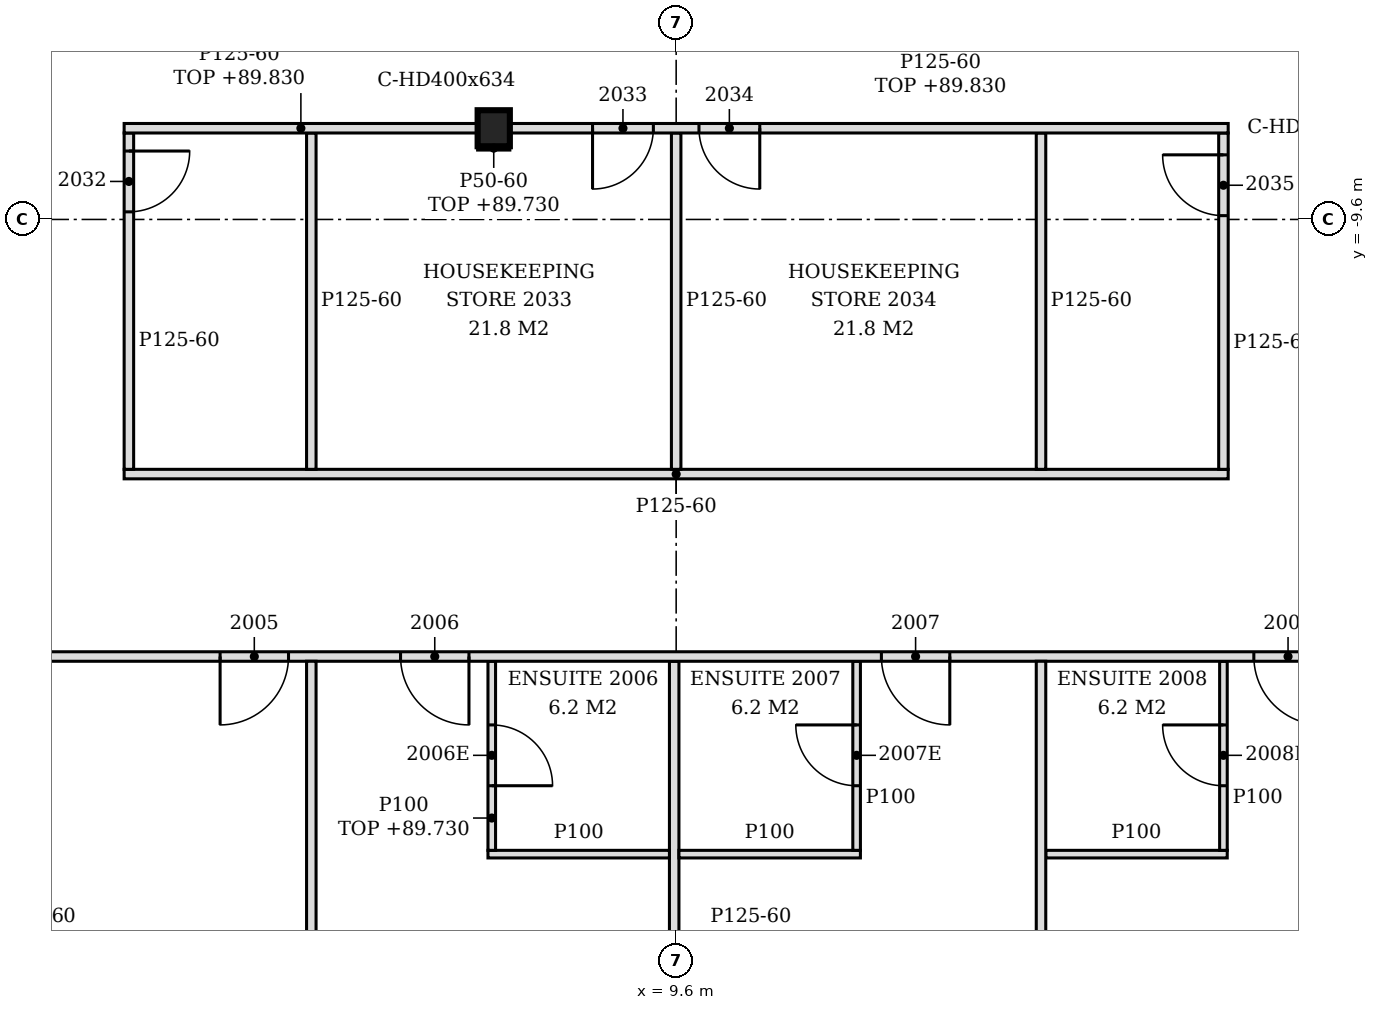
"""IFC4 building model, lengths in metres.
Left out: names, types, materials, properties, quantities, classifications, styles, units other than length and angle.
Written with IfcOpenShell. Run it as: python <this file> out.ifc"""

import sys

from ifc_helpers import new_model, si_unit, direction, frame, frame_2d, origin, origin_2d, place, context, subcontext, project, spatial, polyline, rectangle, i_section, outline, extrude, element, fill, save


model = new_model("IFC4")
c1 = context("Model", 3, precision=1e-05, world=origin(), true_north=direction((0.0, 1.0)))
c2 = subcontext(c1, "Body", "Model", "MODEL_VIEW")
j1 = project(units=[si_unit("LENGTHUNIT", "METRE"), si_unit("PLANEANGLEUNIT", "RADIAN")], contexts=[c1])
p1 = place(None, origin())
s1 = spatial("IfcSite", under=j1, at=p1, CompositionType="ELEMENT")
p2 = place(p1, origin())
s2 = spatial("IfcBuilding", under=s1, at=p2, CompositionType="ELEMENT")
p3 = place(p2, frame((0.0, 0.0, 87.0)))
s3 = spatial("IfcBuildingStorey", under=s2, at=p3, CompositionType="ELEMENT", Elevation=87.0)
p4 = place(p3, frame((7.2, -8.4, -0.15), z_axis=(0.0, 0.0, 1.0), x_axis=(1.0, 0.0, 0.0)))
e1 = element("IfcColumn", 1, at=p4, inside=s3, PredefinedType="COLUMN", context=c2, shape_type="SweptSolid", body=[
    extrude(i_section(OverallWidth=0.424, OverallDepth=0.474, WebThickness=0.048, FlangeThickness=0.077, FilletRadius=0.015, at=origin_2d()), origin(), (0.0, 0.0, 1.0), 3.6),
])
for number, where, z_axis, x_axis in (
    (2, (4.8, -23.65, 0.0), (0.0, 0.0, 1.0), (0.0, 1.0, 0.0)),
    (3, (14.4, -23.65, 0.0), (0.0, 0.0, 1.0), (0.0, 1.0, 0.0)),
):
    element("IfcWall", number, at=place(p3, frame(where, z_axis=z_axis, x_axis=x_axis)), inside=s3, PredefinedType="PARTITIONING", context=c2, shape_type="SweptSolid", body=[
        extrude(outline(polyline([(0.0, 0.0), (8.237, 0.0), (8.238, 3.45), (4.769, 3.45), (4.767, 2.88), (4.559, 2.88), (4.557, 3.45), (0.914, 3.45), (0.912, 2.93), (0.614, 2.93), (0.612, 3.45), (0.0, 3.45), (0.0, 0.0)])), frame((0.0, 0.062, 0.0), z_axis=(0.0, -1.0, 0.0), x_axis=(1.0, 0.0, 0.0)), (0.0, 0.0, 1.0), 0.125),
    ])
p5 = place(p3, frame((9.574, -22.466, 0.0), z_axis=(0.0, 0.0, 1.0), x_axis=(0.0, 1.0, 0.0)))
e4 = element("IfcWall", 4, at=p5, inside=s3, PredefinedType="PARTITIONING", context=c2, shape_type="SweptSolid", body=[
    extrude(outline(polyline([(0.0, 0.0), (7.053, 0.0), (7.053, 0.863), (7.053, 1.725), (7.053, 2.587), (7.053, 2.88), (0.055, 2.88), (0.055, 2.587), (0.055, 1.725), (0.051, 0.863), (0.0, 0.0)])), frame((0.0, 0.062, 0.0), z_axis=(0.0, -1.0, 0.0), x_axis=(1.0, 0.0, 0.0)), (0.0, 0.0, 1.0), 0.125),
])
p6 = place(p3, frame((7.124, -17.95, 0.0), z_axis=(0.0, 0.0, 1.0), x_axis=(1.0, 0.0, 0.0)))
e5 = element("IfcWall", 5, at=p6, inside=s3, PredefinedType="PARTITIONING", context=c2, shape_type="SweptSolid", body=[
    extrude(outline(polyline([(0.0, 0.0), (2.387, 0.0), (2.387, 3.45), (0.226, 3.45), (0.224, 2.73), (0.0, 2.73), (0.0, 0.0)])), frame((0.0, 0.05, 0.0), z_axis=(0.0, -1.0, 0.0), x_axis=(1.0, 0.0, 0.0)), (0.0, 0.0, 1.0), 0.1),
])
p7 = place(p3, frame((7.174, -17.9, 0.0), z_axis=(0.0, 0.0, 1.0), x_axis=(0.0, 1.0, 0.0)))
e6 = element("IfcWall", 6, at=p7, inside=s3, PredefinedType="PARTITIONING", context=c2, shape_type="SweptSolid", body=[
    extrude(rectangle(XDim=2.487, YDim=0.1, at=frame_2d((1.244, 0.0))), origin(), (0.0, 0.0, 1.0), 2.73),
])
p8 = place(p7, frame((0.85, 0.0, 0.0)))
e7 = element("IfcOpeningElement", 7, at=p8, cuts=e6, PredefinedType="OPENING", context=c2, shape_type="SweptSolid", body=[
    extrude(rectangle(XDim=0.8, YDim=2.1, at=frame_2d((0.4, 1.05))), frame((0.0, 0.06, 0.0), z_axis=(0.0, -1.0, 0.0), x_axis=(1.0, 0.0, 0.0)), (0.0, 0.0, 1.0), 0.12),
])
p9 = place(p3, frame((9.636, -17.95, 0.0), z_axis=(0.0, 0.0, 1.0), x_axis=(1.0, 0.0, 0.0)))
e8 = element("IfcWall", 8, at=p9, inside=s3, PredefinedType="PARTITIONING", context=c2, shape_type="SweptSolid", body=[
    extrude(rectangle(XDim=2.387, YDim=0.1, at=frame_2d((1.194, 0.0))), origin(), (0.0, 0.0, 1.0), 3.45),
])
p10 = place(p3, frame((11.974, -17.9, 0.0), z_axis=(0.0, 0.0, 1.0), x_axis=(0.0, 1.0, 0.0)))
e9 = element("IfcWall", 9, at=p10, inside=s3, PredefinedType="PARTITIONING", context=c2, shape_type="SweptSolid", body=[
    extrude(rectangle(XDim=2.487, YDim=0.1, at=frame_2d((1.244, 0.0))), origin(), (0.0, 0.0, 1.0), 3.45),
])
p11 = place(p10, frame((0.85, 0.0, 0.0)))
e10 = element("IfcOpeningElement", 10, at=p11, cuts=e9, PredefinedType="OPENING", context=c2, shape_type="SweptSolid", body=[
    extrude(rectangle(XDim=0.8, YDim=2.1, at=frame_2d((0.4, 1.05))), frame((0.0, 0.06, 0.0), z_axis=(0.0, -1.0, 0.0), x_axis=(1.0, 0.0, 0.0)), (0.0, 0.0, 1.0), 0.12),
])
p12 = place(p3, frame((14.462, -17.95, 0.0), z_axis=(0.0, 0.0, 1.0), x_axis=(1.0, 0.0, 0.0)))
e11 = element("IfcWall", 11, at=p12, inside=s3, PredefinedType="PARTITIONING", context=c2, shape_type="SweptSolid", body=[
    extrude(rectangle(XDim=2.388, YDim=0.1, at=frame_2d((1.194, 0.0))), origin(), (0.0, 0.0, 1.0), 3.45),
])
p13 = place(p3, frame((16.8, -17.9, 0.0), z_axis=(0.0, 0.0, 1.0), x_axis=(0.0, 1.0, 0.0)))
e12 = element("IfcWall", 12, at=p13, inside=s3, PredefinedType="PARTITIONING", context=c2, shape_type="SweptSolid", body=[
    extrude(rectangle(XDim=2.487, YDim=0.1, at=frame_2d((1.244, 0.0))), origin(), (0.0, 0.0, 1.0), 3.45),
])
p14 = place(p13, frame((0.85, 0.0, 0.0)))
e13 = element("IfcOpeningElement", 13, at=p14, cuts=e12, PredefinedType="OPENING", context=c2, shape_type="SweptSolid", body=[
    extrude(rectangle(XDim=0.8, YDim=2.1, at=frame_2d((0.4, 1.05))), frame((0.0, 0.06, 0.0), z_axis=(0.0, -1.0, 0.0), x_axis=(1.0, 0.0, 0.0)), (0.0, 0.0, 1.0), 0.12),
])
p15 = place(p3, frame((-22.75, -15.35, 0.0), z_axis=(0.0, 0.0, 1.0), x_axis=(1.0, 0.0, 0.0)))
e14 = element("IfcWall", 14, at=p15, inside=s3, PredefinedType="PARTITIONING", context=c2, shape_type="SweptSolid", body=[
    extrude(outline(polyline([(0.0, 0.0), (41.887, 0.0), (41.887, 2.73), (41.8, 2.73), (41.798, 3.45), (30.1, 3.45), (30.098, 2.73), (29.8, 2.73), (29.798, 3.45), (18.1, 3.45), (18.098, 2.73), (17.8, 2.73), (17.798, 3.45), (8.5, 3.45), (8.498, 2.93), (8.2, 2.93), (8.198, 3.45), (0.0, 3.45), (0.0, 0.0)])), frame((0.0, 0.062, 0.0), z_axis=(0.0, -1.0, 0.0), x_axis=(1.0, 0.0, 0.0)), (0.0, 0.0, 1.0), 0.125),
])
p16 = place(p15, frame((7.15, 0.0, 0.0)))
e15 = element("IfcOpeningElement", 15, at=p16, cuts=e14, PredefinedType="OPENING", context=c2, shape_type="SweptSolid", body=[
    extrude(rectangle(XDim=0.9, YDim=2.1, at=frame_2d((0.45, 1.05))), frame((0.0, 0.073, 0.0), z_axis=(0.0, -1.0, 0.0), x_axis=(1.0, 0.0, 0.0)), (0.0, 0.0, 1.0), 0.145),
])
p17 = place(p15, frame((9.897, 0.0, 0.0)))
e16 = element("IfcOpeningElement", 16, at=p17, cuts=e14, PredefinedType="OPENING", context=c2, shape_type="SweptSolid", body=[
    extrude(rectangle(XDim=0.9, YDim=2.1, at=frame_2d((0.45, 1.05))), frame((0.0, 0.073, 0.0), z_axis=(0.0, -1.0, 0.0), x_axis=(1.0, 0.0, 0.0)), (0.0, 0.0, 1.0), 0.145),
])
p18 = place(p15, frame((16.75, 0.0, 0.0)))
e17 = element("IfcOpeningElement", 17, at=p18, cuts=e14, PredefinedType="OPENING", context=c2, shape_type="SweptSolid", body=[
    extrude(rectangle(XDim=0.9, YDim=2.1, at=frame_2d((0.45, 1.05))), frame((0.0, 0.073, 0.0), z_axis=(0.0, -1.0, 0.0), x_axis=(1.0, 0.0, 0.0)), (0.0, 0.0, 1.0), 0.145),
])
p19 = place(p15, frame((19.31, 0.0, 0.0)))
e18 = element("IfcOpeningElement", 18, at=p19, cuts=e14, PredefinedType="OPENING", context=c2, shape_type="SweptSolid", body=[
    extrude(rectangle(XDim=0.9, YDim=2.1, at=frame_2d((0.45, 1.05))), frame((0.0, 0.073, 0.0), z_axis=(0.0, -1.0, 0.0), x_axis=(1.0, 0.0, 0.0)), (0.0, 0.0, 1.0), 0.145),
])
p20 = place(p15, frame((26.35, 0.0, 0.0)))
e19 = element("IfcOpeningElement", 19, at=p20, cuts=e14, PredefinedType="OPENING", context=c2, shape_type="SweptSolid", body=[
    extrude(rectangle(XDim=0.9, YDim=2.1, at=frame_2d((0.45, 1.05))), frame((0.0, 0.073, 0.0), z_axis=(0.0, -1.0, 0.0), x_axis=(1.0, 0.0, 0.0)), (0.0, 0.0, 1.0), 0.145),
])
p21 = place(p15, frame((28.724, 0.0, 0.0)))
e20 = element("IfcOpeningElement", 20, at=p21, cuts=e14, PredefinedType="OPENING", context=c2, shape_type="SweptSolid", body=[
    extrude(rectangle(XDim=0.9, YDim=2.1, at=frame_2d((0.45, 1.05))), frame((0.0, 0.073, 0.0), z_axis=(0.0, -1.0, 0.0), x_axis=(1.0, 0.0, 0.0)), (0.0, 0.0, 1.0), 0.145),
])
p22 = place(p15, frame((35.05, 0.0, 0.0)))
e21 = element("IfcOpeningElement", 21, at=p22, cuts=e14, PredefinedType="OPENING", context=c2, shape_type="SweptSolid", body=[
    extrude(rectangle(XDim=0.9, YDim=2.1, at=frame_2d((0.45, 1.05))), frame((0.0, 0.073, 0.0), z_axis=(0.0, -1.0, 0.0), x_axis=(1.0, 0.0, 0.0)), (0.0, 0.0, 1.0), 0.145),
])
p23 = place(p15, frame((39.95, 0.0, 0.0)))
e22 = element("IfcOpeningElement", 22, at=p23, cuts=e14, PredefinedType="OPENING", context=c2, shape_type="SweptSolid", body=[
    extrude(rectangle(XDim=0.9, YDim=2.1, at=frame_2d((0.45, 1.05))), frame((0.0, 0.073, 0.0), z_axis=(0.0, -1.0, 0.0), x_axis=(1.0, 0.0, 0.0)), (0.0, 0.0, 1.0), 0.145),
])
p24 = place(p3, frame((2.337, -12.95, 0.0), z_axis=(0.0, 0.0, 1.0), x_axis=(1.0, 0.0, 0.0)))
e23 = element("IfcWall", 23, at=p24, inside=s3, PredefinedType="PARTITIONING", context=c2, shape_type="SweptSolid", body=[
    extrude(outline(polyline([(0.0, 0.0), (14.525, 0.0), (14.525, 3.45), (5.012, 3.45), (5.01, 2.73), (4.712, 2.73), (4.71, 3.45), (0.0, 3.45), (0.0, 0.0)])), frame((0.0, 0.062, 0.0), z_axis=(0.0, -1.0, 0.0), x_axis=(1.0, 0.0, 0.0)), (0.0, 0.0, 1.0), 0.125),
])
p25 = place(p3, frame((2.4, -12.887, 0.0), z_axis=(0.0, 0.0, 1.0), x_axis=(0.0, 1.0, 0.0)))
e24 = element("IfcWall", 24, at=p25, inside=s3, PredefinedType="PARTITIONING", context=c2, shape_type="SweptSolid", body=[
    extrude(outline(polyline([(0.0, 0.0), (4.425, 0.0), (4.425, 2.83), (4.337, 2.83), (4.335, 3.45), (0.0, 3.45), (0.0, 0.0)])), frame((0.0, 0.062, 0.0), z_axis=(0.0, -1.0, 0.0), x_axis=(1.0, 0.0, 0.0)), (0.0, 0.0, 1.0), 0.125),
])
p26 = place(p25, frame((3.387, 0.0, 0.0)))
e25 = element("IfcOpeningElement", 25, at=p26, cuts=e24, PredefinedType="OPENING", context=c2, shape_type="SweptSolid", body=[
    extrude(rectangle(XDim=0.8, YDim=2.1, at=frame_2d((0.4, 1.05))), frame((0.0, 0.073, 0.0), z_axis=(0.0, -1.0, 0.0), x_axis=(1.0, 0.0, 0.0)), (0.0, 0.0, 1.0), 0.145),
])
for number, where, z_axis, x_axis in (
    (26, (4.8, -12.887, 0.0), (0.0, 0.0, 1.0), (0.0, 1.0, 0.0)),
    (27, (9.6, -12.887, 0.0), (0.0, 0.0, 1.0), (0.0, 1.0, 0.0)),
    (28, (14.4, -12.887, 0.0), (0.0, 0.0, 1.0), (0.0, 1.0, 0.0)),
):
    element("IfcWall", number, at=place(p3, frame(where, z_axis=z_axis, x_axis=x_axis)), inside=s3, PredefinedType="PARTITIONING", context=c2, shape_type="SweptSolid", body=[
        extrude(outline(polyline([(0.0, 0.0), (4.425, 0.0), (4.425, 2.83), (4.337, 2.83), (4.335, 3.45), (0.0, 3.45), (0.0, 0.0)])), frame((0.0, 0.062, 0.0), z_axis=(0.0, -1.0, 0.0), x_axis=(1.0, 0.0, 0.0)), (0.0, 0.0, 1.0), 0.125),
    ])
p27 = place(p3, frame((16.8, -12.887, 0.0), z_axis=(0.0, 0.0, 1.0), x_axis=(0.0, 1.0, 0.0)))
e29 = element("IfcWall", 29, at=p27, inside=s3, PredefinedType="PARTITIONING", context=c2, shape_type="SweptSolid", body=[
    extrude(outline(polyline([(0.0, 0.0), (4.425, 0.0), (4.425, 2.83), (4.337, 2.83), (4.335, 3.45), (0.0, 3.45), (0.0, 0.0)])), frame((0.0, 0.062, 0.0), z_axis=(0.0, -1.0, 0.0), x_axis=(1.0, 0.0, 0.0)), (0.0, 0.0, 1.0), 0.125),
])
p28 = place(p27, frame((3.337, 0.0, 0.0)))
e30 = element("IfcOpeningElement", 30, at=p28, cuts=e29, PredefinedType="OPENING", context=c2, shape_type="SweptSolid", body=[
    extrude(rectangle(XDim=0.8, YDim=2.1, at=frame_2d((0.4, 1.05))), frame((0.0, 0.073, 0.0), z_axis=(0.0, -1.0, 0.0), x_axis=(1.0, 0.0, 0.0)), (0.0, 0.0, 1.0), 0.145),
])
p29 = place(p3, frame((2.337, -8.4, 0.0), z_axis=(0.0, 0.0, 1.0), x_axis=(1.0, 0.0, 0.0)))
e31 = element("IfcWall", 31, at=p29, inside=s3, PredefinedType="PARTITIONING", context=c2, shape_type="SweptSolid", body=[
    extrude(rectangle(XDim=4.651, YDim=0.125, at=frame_2d((2.325, 0.0))), origin(), (0.0, 0.0, 1.0), 2.83),
])
p30 = place(p3, frame((7.412, -8.4, 0.0), z_axis=(0.0, 0.0, 1.0), x_axis=(1.0, 0.0, 0.0)))
e32 = element("IfcWall", 32, at=p30, inside=s3, PredefinedType="PARTITIONING", context=c2, shape_type="SweptSolid", body=[
    extrude(rectangle(XDim=9.45, YDim=0.125, at=frame_2d((4.725, 0.0))), origin(), (0.0, 0.0, 1.0), 2.83),
])
p31 = place(p30, frame((1.088, 0.0, 0.0)))
e33 = element("IfcOpeningElement", 33, at=p31, cuts=e32, PredefinedType="OPENING", context=c2, shape_type="SweptSolid", body=[
    extrude(rectangle(XDim=0.8, YDim=2.1, at=frame_2d((0.4, 1.05))), frame((0.0, 0.073, 0.0), z_axis=(0.0, -1.0, 0.0), x_axis=(1.0, 0.0, 0.0)), (0.0, 0.0, 1.0), 0.145),
])
p32 = place(p30, frame((2.488, 0.0, 0.0)))
e34 = element("IfcOpeningElement", 34, at=p32, cuts=e32, PredefinedType="OPENING", context=c2, shape_type="SweptSolid", body=[
    extrude(rectangle(XDim=0.8, YDim=2.1, at=frame_2d((0.4, 1.05))), frame((0.0, 0.073, 0.0), z_axis=(0.0, -1.0, 0.0), x_axis=(1.0, 0.0, 0.0)), (0.0, 0.0, 1.0), 0.145),
])
p33 = place(p3, frame((6.988, -8.662, 0.0), z_axis=(0.0, 0.0, 1.0), x_axis=(1.0, 0.0, 0.0)))
e35 = element("IfcWall", 35, at=p33, inside=s3, PredefinedType="PARTITIONING", context=c2, shape_type="SweptSolid", body=[
    extrude(rectangle(XDim=0.424, YDim=0.05, at=frame_2d((0.212, 0.0))), origin(), (0.0, 0.0, 1.0), 2.73),
])
p34 = place(p20, frame((0.9, 0.0, 0.0), z_axis=(0.0, 0.0, 1.0), x_axis=(-1.0, 0.0, 0.0)))
e36 = element("IfcDoor", 36, at=p34, inside=s3, OperationType="SINGLE_SWING_RIGHT", PredefinedType="DOOR", context=c2, shape_type="SweptSolid", body=[
    extrude(rectangle(XDim=0.9, YDim=2.1, at=frame_2d((0.45, 1.05))), frame((0.0, 0.025, 0.0), z_axis=(0.0, -1.0, 0.0), x_axis=(1.0, 0.0, 0.0)), (0.0, 0.0, 1.0), 0.05),
])
fill(e19, e36)
p35 = place(p21, frame((0.9, 0.0, 0.0), z_axis=(0.0, 0.0, 1.0), x_axis=(-1.0, 0.0, 0.0)))
e37 = element("IfcDoor", 37, at=p35, inside=s3, OperationType="SINGLE_SWING_LEFT", PredefinedType="DOOR", context=c2, shape_type="SweptSolid", body=[
    extrude(rectangle(XDim=0.9, YDim=2.1, at=frame_2d((0.45, 1.05))), frame((0.0, 0.025, 0.0), z_axis=(0.0, -1.0, 0.0), x_axis=(1.0, 0.0, 0.0)), (0.0, 0.0, 1.0), 0.05),
])
fill(e20, e37)
p36 = place(p8, frame((0.8, 0.0, 0.0), z_axis=(0.0, 0.0, 1.0), x_axis=(-1.0, 0.0, 0.0)))
e38 = element("IfcDoor", 38, at=p36, inside=s3, OperationType="SINGLE_SWING_RIGHT", PredefinedType="DOOR", context=c2, shape_type="SweptSolid", body=[
    extrude(rectangle(XDim=0.8, YDim=2.1, at=frame_2d((0.4, 1.05))), frame((0.0, 0.025, 0.0), z_axis=(0.0, -1.0, 0.0), x_axis=(1.0, 0.0, 0.0)), (0.0, 0.0, 1.0), 0.05),
])
fill(e7, e38)
p37 = place(p22, frame((0.9, 0.0, 0.0), z_axis=(0.0, 0.0, 1.0), x_axis=(-1.0, 0.0, 0.0)))
e39 = element("IfcDoor", 39, at=p37, inside=s3, OperationType="SINGLE_SWING_LEFT", PredefinedType="DOOR", context=c2, shape_type="SweptSolid", body=[
    extrude(rectangle(XDim=0.9, YDim=2.1, at=frame_2d((0.45, 1.05))), frame((0.0, 0.025, 0.0), z_axis=(0.0, -1.0, 0.0), x_axis=(1.0, 0.0, 0.0)), (0.0, 0.0, 1.0), 0.05),
])
fill(e21, e39)
p38 = place(p11, origin())
e40 = element("IfcDoor", 40, at=p38, inside=s3, OperationType="SINGLE_SWING_RIGHT", PredefinedType="DOOR", context=c2, shape_type="SweptSolid", body=[
    extrude(rectangle(XDim=0.8, YDim=2.1, at=frame_2d((0.4, 1.05))), frame((0.0, 0.025, 0.0), z_axis=(0.0, -1.0, 0.0), x_axis=(1.0, 0.0, 0.0)), (0.0, 0.0, 1.0), 0.05),
])
fill(e10, e40)
p39 = place(p23, frame((0.9, 0.0, 0.0), z_axis=(0.0, 0.0, 1.0), x_axis=(-1.0, 0.0, 0.0)))
e41 = element("IfcDoor", 41, at=p39, inside=s3, OperationType="SINGLE_SWING_LEFT", PredefinedType="DOOR", context=c2, shape_type="SweptSolid", body=[
    extrude(rectangle(XDim=0.9, YDim=2.1, at=frame_2d((0.45, 1.05))), frame((0.0, 0.025, 0.0), z_axis=(0.0, -1.0, 0.0), x_axis=(1.0, 0.0, 0.0)), (0.0, 0.0, 1.0), 0.05),
])
fill(e22, e41)
p40 = place(p14, origin())
e42 = element("IfcDoor", 42, at=p40, inside=s3, OperationType="SINGLE_SWING_RIGHT", PredefinedType="DOOR", context=c2, shape_type="SweptSolid", body=[
    extrude(rectangle(XDim=0.8, YDim=2.1, at=frame_2d((0.4, 1.05))), frame((0.0, 0.025, 0.0), z_axis=(0.0, -1.0, 0.0), x_axis=(1.0, 0.0, 0.0)), (0.0, 0.0, 1.0), 0.05),
])
fill(e13, e42)
p41 = place(p26, frame((0.8, 0.0, 0.0), z_axis=(0.0, 0.0, 1.0), x_axis=(-1.0, 0.0, 0.0)))
e43 = element("IfcDoor", 43, at=p41, inside=s3, OperationType="SINGLE_SWING_LEFT", PredefinedType="DOOR", context=c2, shape_type="SweptSolid", body=[
    extrude(rectangle(XDim=0.8, YDim=2.1, at=frame_2d((0.4, 1.05))), frame((0.0, 0.025, 0.0), z_axis=(0.0, -1.0, 0.0), x_axis=(1.0, 0.0, 0.0)), (0.0, 0.0, 1.0), 0.05),
])
fill(e25, e43)
p42 = place(p31, frame((0.8, 0.0, 0.0), z_axis=(0.0, 0.0, 1.0), x_axis=(-1.0, 0.0, 0.0)))
e44 = element("IfcDoor", 44, at=p42, inside=s3, OperationType="SINGLE_SWING_RIGHT", PredefinedType="DOOR", context=c2, shape_type="SweptSolid", body=[
    extrude(rectangle(XDim=0.8, YDim=2.1, at=frame_2d((0.4, 1.05))), frame((0.0, 0.025, 0.0), z_axis=(0.0, -1.0, 0.0), x_axis=(1.0, 0.0, 0.0)), (0.0, 0.0, 1.0), 0.05),
])
fill(e33, e44)
p43 = place(p32, frame((0.8, 0.0, 0.0), z_axis=(0.0, 0.0, 1.0), x_axis=(-1.0, 0.0, 0.0)))
e45 = element("IfcDoor", 45, at=p43, inside=s3, OperationType="SINGLE_SWING_LEFT", PredefinedType="DOOR", context=c2, shape_type="SweptSolid", body=[
    extrude(rectangle(XDim=0.8, YDim=2.1, at=frame_2d((0.4, 1.05))), frame((0.0, 0.025, 0.0), z_axis=(0.0, -1.0, 0.0), x_axis=(1.0, 0.0, 0.0)), (0.0, 0.0, 1.0), 0.05),
])
fill(e34, e45)
p44 = place(p28, origin())
e46 = element("IfcDoor", 46, at=p44, inside=s3, OperationType="SINGLE_SWING_RIGHT", PredefinedType="DOOR", context=c2, shape_type="SweptSolid", body=[
    extrude(rectangle(XDim=0.8, YDim=2.1, at=frame_2d((0.4, 1.05))), frame((0.0, 0.025, 0.0), z_axis=(0.0, -1.0, 0.0), x_axis=(1.0, 0.0, 0.0)), (0.0, 0.0, 1.0), 0.05),
])
fill(e30, e46)
save(model, sys.argv[1])
